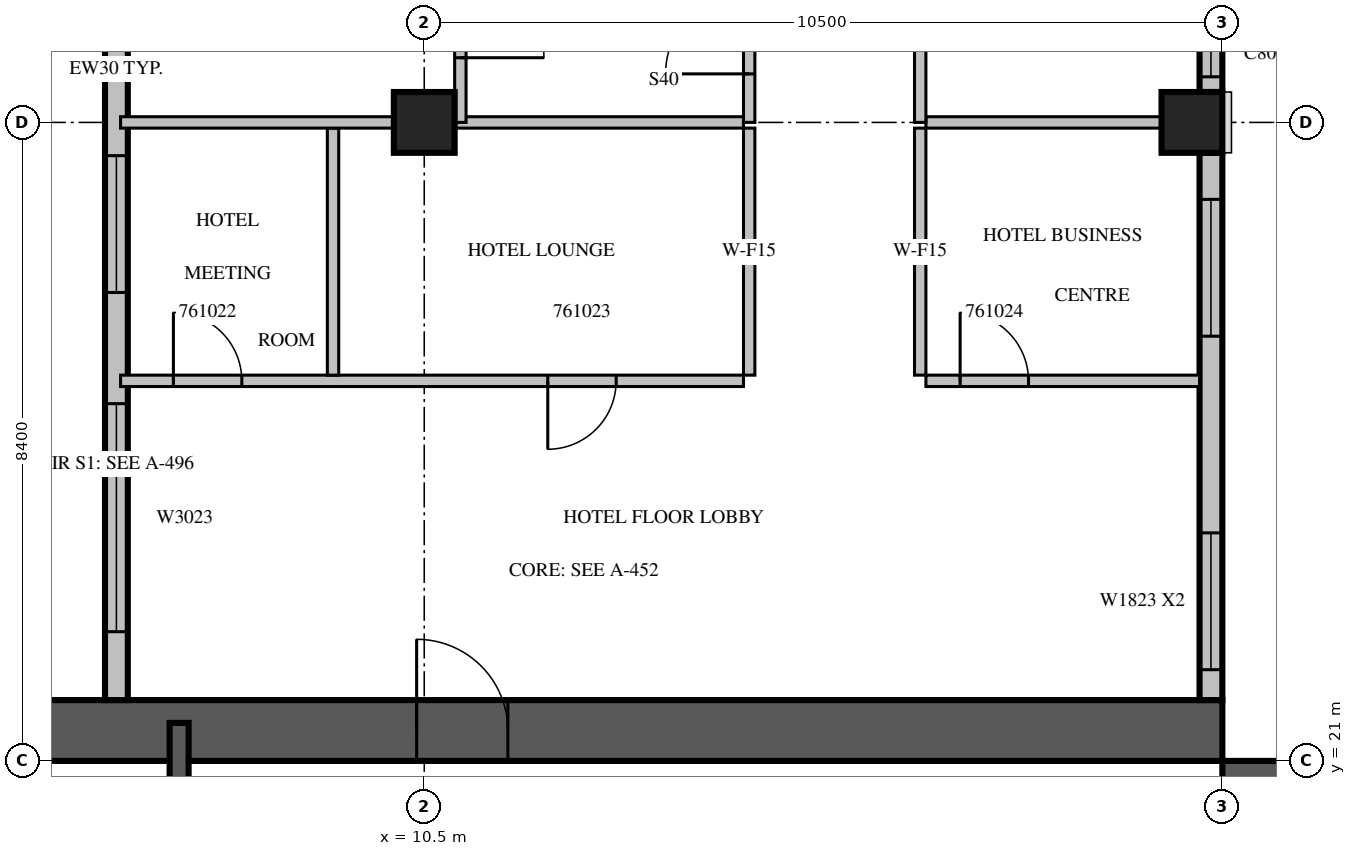
"""IFC4 building model, lengths in metres.
Left out: names, types, materials, properties, quantities, classifications, styles, units other than length and angle.
Written with IfcOpenShell. Run it as: python <this file> out.ifc"""

import sys

from ifc_helpers import new_model, si_unit, direction, frame, frame_2d, origin, origin_2d, place, context, subcontext, project, spatial, rectangle, extrude, source, transform, mapped, element, fill, save


model = new_model("IFC4")
c1 = context("Model", 3, precision=1e-05, world=origin(), true_north=direction((0.0, 1.0)))
c2 = subcontext(c1, "Body", "Model", "MODEL_VIEW")
j1 = project(units=[si_unit("LENGTHUNIT", "METRE"), si_unit("PLANEANGLEUNIT", "RADIAN")], contexts=[c1])
p1 = place(None, origin())
s1 = spatial("IfcSite", under=j1, at=p1, CompositionType="ELEMENT")
p2 = place(p1, origin())
s2 = spatial("IfcBuilding", under=s1, at=p2, CompositionType="ELEMENT")
p3 = place(p2, frame((0.0, 0.0, 265.2)))
s3 = spatial("IfcBuildingStorey", under=s2, at=p3, CompositionType="ELEMENT", Elevation=265.2)
m1 = source(origin(), c2, "Body", "SweptSolid", [
    extrude(rectangle(XDim=0.8, YDim=0.8, at=origin_2d()), origin(), (0.0, 0.0, 1.0), 3.8),
])
for number, where, z_axis, x_axis in (
    (1, (10.5, 29.4, 0.0), (0.0, 0.0, 1.0), (1.0, 0.0, 0.0)),
    (2, (20.6, 29.4, 0.0), (0.0, 0.0, 1.0), (1.0, 0.0, 0.0)),
):
    element("IfcColumn", number, at=place(p3, frame(where, z_axis=z_axis, x_axis=x_axis)), inside=s3, PredefinedType="COLUMN", context=c2, shape_type="MappedRepresentation", body=[
        mapped(m1, transform((0.0, 0.0, 0.0), scale=1.0)),
    ])
m2 = source(origin(), c2, "Body", "SweptSolid", [
    extrude(rectangle(XDim=16.8, YDim=0.8, at=frame_2d((8.4, 0.0))), origin(), (0.0, 0.0, 1.0), 3.8),
])
p4 = place(p3, frame((21.4, 4.2, 0.0), z_axis=(0.0, 0.0, 1.0), x_axis=(0.0, 1.0, 0.0)))
e3 = element("IfcWall", 3, at=p4, inside=s3, PredefinedType="SHEAR", context=c2, shape_type="MappedRepresentation", body=[
    mapped(m2, transform((0.0, 0.0, 0.0), scale=1.0)),
])
m3 = source(origin(), c2, "Body", "SweptSolid", [
    extrude(rectangle(XDim=2.2, YDim=2.1, at=frame_2d((1.1, 1.05))), frame((0.0, 0.41, 0.0), z_axis=(0.0, -1.0, 0.0), x_axis=(1.0, 0.0, 0.0)), (0.0, 0.0, 1.0), 0.82),
])
p5 = place(p4, frame((4.2, 0.0, 0.0)))
e4 = element("IfcOpeningElement", 4, at=p5, cuts=e3, PredefinedType="OPENING", context=c2, shape_type="MappedRepresentation", body=[
    mapped(m3, transform((0.0, 0.0, 0.0), scale=1.0)),
])
m4 = source(origin(), c2, "Body", "SweptSolid", [
    extrude(rectangle(XDim=1.2, YDim=2.1, at=frame_2d((0.6, 1.05))), frame((0.0, 0.41, 0.0), z_axis=(0.0, -1.0, 0.0), x_axis=(1.0, 0.0, 0.0)), (0.0, 0.0, 1.0), 0.82),
])
p6 = place(p4, frame((14.7, 0.0, 0.0)))
e5 = element("IfcOpeningElement", 5, at=p6, cuts=e3, PredefinedType="OPENING", context=c2, shape_type="MappedRepresentation", body=[
    mapped(m4, transform((0.0, 0.0, 0.0), scale=1.0)),
])
p7 = place(p3, frame((4.2, 21.4, 0.0), z_axis=(0.0, 0.0, 1.0), x_axis=(1.0, 0.0, 0.0)))
e6 = element("IfcWall", 6, at=p7, inside=s3, PredefinedType="SHEAR", context=c2, shape_type="MappedRepresentation", body=[
    mapped(m2, transform((0.0, 0.0, 0.0), scale=1.0)),
])
p8 = place(p7, frame((6.2, 0.0, 0.0)))
e7 = element("IfcOpeningElement", 7, at=p8, cuts=e6, PredefinedType="OPENING", context=c2, shape_type="MappedRepresentation", body=[
    mapped(m4, transform((0.0, 0.0, 0.0), scale=1.0)),
])
m5 = source(origin(), c2, "Body", "SweptSolid", [
    extrude(rectangle(XDim=7.2, YDim=0.3, at=frame_2d((3.6, 0.0))), origin(), (0.0, 0.0, 1.0), 3.4),
])
p9 = place(p3, frame((20.85, 21.8, 0.0), z_axis=(0.0, 0.0, 1.0), x_axis=(0.0, 1.0, 0.0)))
e8 = element("IfcWall", 8, at=p9, inside=s3, PredefinedType="STANDARD", context=c2, shape_type="MappedRepresentation", body=[
    mapped(m5, transform((0.0, 0.0, 0.0), scale=1.0)),
])
m6 = source(origin(), c2, "Body", "SweptSolid", [
    extrude(rectangle(XDim=1.8, YDim=2.3, at=frame_2d((0.9, 1.15))), frame((0.0, 0.16, 0.0), z_axis=(0.0, -1.0, 0.0), x_axis=(1.0, 0.0, 0.0)), (0.0, 0.0, 1.0), 0.32),
])
p10 = place(p9, frame((0.4, 0.0, 0.6)))
e9 = element("IfcOpeningElement", 9, at=p10, cuts=e8, PredefinedType="OPENING", context=c2, shape_type="MappedRepresentation", body=[
    mapped(m6, transform((0.0, 0.0, 0.0), scale=1.0)),
])
p11 = place(p9, frame((4.787, 0.0, 0.6)))
e10 = element("IfcOpeningElement", 10, at=p11, cuts=e8, PredefinedType="OPENING", context=c2, shape_type="MappedRepresentation", body=[
    mapped(m6, transform((0.0, 0.0, 0.0), scale=1.0)),
])
m7 = source(origin(), c2, "Body", "SweptSolid", [
    extrude(rectangle(XDim=7.6, YDim=0.3, at=frame_2d((3.8, 0.0))), origin(), (0.0, 0.0, 1.0), 3.4),
])
p12 = place(p3, frame((20.85, 29.8, 0.0), z_axis=(0.0, 0.0, 1.0), x_axis=(0.0, 1.0, 0.0)))
e11 = element("IfcWall", 11, at=p12, inside=s3, PredefinedType="STANDARD", context=c2, shape_type="MappedRepresentation", body=[
    mapped(m7, transform((0.0, 0.0, 0.0), scale=1.0)),
])
m8 = source(origin(), c2, "Body", "SweptSolid", [
    extrude(rectangle(XDim=3.0, YDim=2.3, at=frame_2d((1.5, 1.15))), frame((0.0, 0.16, 0.0), z_axis=(0.0, -1.0, 0.0), x_axis=(1.0, 0.0, 0.0)), (0.0, 0.0, 1.0), 0.32),
])
p13 = place(p12, frame((0.2, 0.0, 0.6)))
e12 = element("IfcOpeningElement", 12, at=p13, cuts=e11, PredefinedType="OPENING", context=c2, shape_type="MappedRepresentation", body=[
    mapped(m8, transform((0.0, 0.0, 0.0), scale=1.0)),
])
p14 = place(p12, frame((4.4, 0.0, 0.6)))
e13 = element("IfcOpeningElement", 13, at=p14, cuts=e11, PredefinedType="OPENING", context=c2, shape_type="MappedRepresentation", body=[
    mapped(m8, transform((0.0, 0.0, 0.0), scale=1.0)),
])
m9 = source(origin(), c2, "Body", "SweptSolid", [
    extrude(rectangle(XDim=16.6, YDim=0.3, at=frame_2d((8.3, 0.0))), origin(), (0.0, 0.0, 1.0), 3.4),
])
p15 = place(p3, frame((6.45, 38.4, 0.0), z_axis=(0.0, 0.0, 1.0), x_axis=(0.0, -1.0, 0.0)))
e14 = element("IfcWall", 14, at=p15, inside=s3, PredefinedType="STANDARD", context=c2, shape_type="MappedRepresentation", body=[
    mapped(m9, transform((0.0, 0.0, 0.0), scale=1.0)),
])
p16 = place(p15, frame((1.15, 0.0, 0.6)))
e15 = element("IfcOpeningElement", 15, at=p16, cuts=e14, PredefinedType="OPENING", context=c2, shape_type="MappedRepresentation", body=[
    mapped(m6, transform((0.0, 0.0, 0.0), scale=1.0)),
])
m10 = source(origin(), c2, "Body", "SweptSolid", [
    extrude(rectangle(XDim=2.4, YDim=2.3, at=frame_2d((1.2, 1.15))), frame((0.0, 0.16, 0.0), z_axis=(0.0, -1.0, 0.0), x_axis=(1.0, 0.0, 0.0)), (0.0, 0.0, 1.0), 0.32),
])
p17 = place(p15, frame((4.75, 0.0, 0.6)))
e16 = element("IfcOpeningElement", 16, at=p17, cuts=e14, PredefinedType="OPENING", context=c2, shape_type="MappedRepresentation", body=[
    mapped(m10, transform((0.0, 0.0, 0.0), scale=1.0)),
])
p18 = place(p15, frame((9.438, 0.0, 0.6)))
e17 = element("IfcOpeningElement", 17, at=p18, cuts=e14, PredefinedType="OPENING", context=c2, shape_type="MappedRepresentation", body=[
    mapped(m6, transform((0.0, 0.0, 0.0), scale=1.0)),
])
p19 = place(p15, frame((12.7, 0.0, 0.6)))
e18 = element("IfcOpeningElement", 18, at=p19, cuts=e14, PredefinedType="OPENING", context=c2, shape_type="MappedRepresentation", body=[
    mapped(m8, transform((0.0, 0.0, 0.0), scale=1.0)),
])
m11 = source(origin(), c2, "Body", "SweptSolid", [
    extrude(rectangle(XDim=6.6, YDim=0.25, at=frame_2d((3.3, 0.0))), origin(), (0.0, 0.0, 1.0), 3.4),
])
p20 = place(p3, frame((7.275, 14.9, 0.0), z_axis=(0.0, 0.0, 1.0), x_axis=(0.0, 1.0, 0.0)))
e19 = element("IfcWall", 19, at=p20, inside=s3, PredefinedType="SOLIDWALL", context=c2, shape_type="MappedRepresentation", body=[
    mapped(m11, transform((0.0, 0.0, 0.0), scale=1.0)),
])
m12 = source(origin(), c2, "Body", "SweptSolid", [
    extrude(rectangle(XDim=1.1, YDim=2.1, at=frame_2d((0.55, 1.05))), frame((0.0, 0.135, 0.0), z_axis=(0.0, -1.0, 0.0), x_axis=(1.0, 0.0, 0.0)), (0.0, 0.0, 1.0), 0.27),
])
p21 = place(p20, frame((0.15, 0.0, 0.0)))
e20 = element("IfcOpeningElement", 20, at=p21, cuts=e19, PredefinedType="OPENING", context=c2, shape_type="MappedRepresentation", body=[
    mapped(m12, transform((0.0, 0.0, 0.0), scale=1.0)),
])
m13 = source(origin(), c2, "Body", "SweptSolid", [
    extrude(rectangle(XDim=8.195, YDim=0.15, at=frame_2d((4.098, 0.0))), origin(), (0.0, 0.0, 1.0), 3.4),
])
p22 = place(p3, frame((6.505, 26.0, 0.0), z_axis=(0.0, 0.0, 1.0), x_axis=(1.0, 0.0, 0.0)))
e21 = element("IfcWall", 21, at=p22, inside=s3, PredefinedType="PARTITIONING", context=c2, shape_type="MappedRepresentation", body=[
    mapped(m13, transform((0.0, 0.0, 0.0), scale=1.0)),
])
m14 = source(origin(), c2, "Body", "SweptSolid", [
    extrude(rectangle(XDim=0.9, YDim=2.1, at=frame_2d((0.45, 1.05))), frame((0.0, 0.085, 0.0), z_axis=(0.0, -1.0, 0.0), x_axis=(1.0, 0.0, 0.0)), (0.0, 0.0, 1.0), 0.17),
])
p23 = place(p22, frame((0.695, 0.0, 0.0)))
e22 = element("IfcOpeningElement", 22, at=p23, cuts=e21, PredefinedType="OPENING", context=c2, shape_type="MappedRepresentation", body=[
    mapped(m14, transform((0.0, 0.0, 0.0), scale=1.0)),
])
p24 = place(p22, frame((5.62, 0.0, 0.0)))
e23 = element("IfcOpeningElement", 23, at=p24, cuts=e21, PredefinedType="OPENING", context=c2, shape_type="MappedRepresentation", body=[
    mapped(m14, transform((0.0, 0.0, 0.0), scale=1.0)),
])
m15 = source(origin(), c2, "Body", "SweptSolid", [
    extrude(rectangle(XDim=3.6, YDim=0.15, at=frame_2d((1.8, 0.0))), origin(), (0.0, 0.0, 1.0), 3.4),
])
p25 = place(p3, frame((17.1, 26.0, 0.0), z_axis=(0.0, 0.0, 1.0), x_axis=(1.0, 0.0, 0.0)))
e24 = element("IfcWall", 24, at=p25, inside=s3, PredefinedType="PARTITIONING", context=c2, shape_type="MappedRepresentation", body=[
    mapped(m15, transform((0.0, 0.0, 0.0), scale=1.0)),
])
p26 = place(p25, frame((0.45, 0.0, 0.0)))
e25 = element("IfcOpeningElement", 25, at=p26, cuts=e24, PredefinedType="OPENING", context=c2, shape_type="MappedRepresentation", body=[
    mapped(m14, transform((0.0, 0.0, 0.0), scale=1.0)),
])
m16 = source(origin(), c2, "Body", "SweptSolid", [
    extrude(rectangle(XDim=3.25, YDim=0.15, at=frame_2d((1.625, 0.0))), origin(), (0.0, 0.0, 1.0), 3.4),
])
for number, where, z_axis, x_axis in (
    (26, (9.3, 26.075, 0.0), (0.0, 0.0, 1.0), (0.0, 1.0, 0.0)),
    (27, (14.775, 26.075, 0.0), (0.0, 0.0, 1.0), (0.0, 1.0, 0.0)),
    (28, (17.025, 29.325, 0.0), (0.0, 0.0, 1.0), (0.0, -1.0, 0.0)),
):
    element("IfcWall", number, at=place(p3, frame(where, z_axis=z_axis, x_axis=x_axis)), inside=s3, PredefinedType="PARTITIONING", context=c2, shape_type="MappedRepresentation", body=[
        mapped(m16, transform((0.0, 0.0, 0.0), scale=1.0)),
    ])
m17 = source(origin(), c2, "Body", "SweptSolid", [
    extrude(rectangle(XDim=3.596, YDim=0.15, at=frame_2d((1.798, 0.0))), origin(), (0.0, 0.0, 1.0), 3.4),
])
p27 = place(p3, frame((10.101, 29.4, 0.0), z_axis=(0.0, 0.0, 1.0), x_axis=(-1.0, 0.0, 0.0)))
e29 = element("IfcWall", 29, at=p27, inside=s3, PredefinedType="PARTITIONING", context=c2, shape_type="MappedRepresentation", body=[
    mapped(m17, transform((0.0, 0.0, 0.0), scale=1.0)),
])
m18 = source(origin(), c2, "Body", "SweptSolid", [
    extrude(rectangle(XDim=3.801, YDim=0.15, at=frame_2d((1.901, 0.0))), origin(), (0.0, 0.0, 1.0), 3.4),
])
p28 = place(p3, frame((14.7, 29.4, 0.0), z_axis=(0.0, 0.0, 1.0), x_axis=(-1.0, 0.0, 0.0)))
e30 = element("IfcWall", 30, at=p28, inside=s3, PredefinedType="PARTITIONING", context=c2, shape_type="MappedRepresentation", body=[
    mapped(m18, transform((0.0, 0.0, 0.0), scale=1.0)),
])
m19 = source(origin(), c2, "Body", "SweptSolid", [
    extrude(rectangle(XDim=3.101, YDim=0.15, at=frame_2d((1.55, 0.0))), origin(), (0.0, 0.0, 1.0), 3.4),
])
p29 = place(p3, frame((20.201, 29.4, 0.0), z_axis=(0.0, 0.0, 1.0), x_axis=(-1.0, 0.0, 0.0)))
e31 = element("IfcWall", 31, at=p29, inside=s3, PredefinedType="PARTITIONING", context=c2, shape_type="MappedRepresentation", body=[
    mapped(m19, transform((0.0, 0.0, 0.0), scale=1.0)),
])
m20 = source(origin(), c2, "Body", "SweptSolid", [
    extrude(rectangle(XDim=8.4, YDim=0.15, at=frame_2d((4.2, 0.0))), origin(), (0.0, 0.0, 1.0), 3.4),
])
p30 = place(p3, frame((10.975, 29.4, 0.0), z_axis=(0.0, 0.0, 1.0), x_axis=(0.0, 1.0, 0.0)))
e32 = element("IfcWall", 32, at=p30, inside=s3, PredefinedType="PARTITIONING", context=c2, shape_type="MappedRepresentation", body=[
    mapped(m20, transform((0.0, 0.0, 0.0), scale=1.0)),
])
m21 = source(origin(), c2, "Body", "SweptSolid", [
    extrude(rectangle(XDim=1.1, YDim=2.1, at=frame_2d((0.55, 1.05))), frame((0.0, 0.085, 0.0), z_axis=(0.0, -1.0, 0.0), x_axis=(1.0, 0.0, 0.0)), (0.0, 0.0, 1.0), 0.17),
])
p31 = place(p30, frame((0.851, 0.0, 0.0)))
e33 = element("IfcOpeningElement", 33, at=p31, cuts=e32, PredefinedType="OPENING", context=c2, shape_type="MappedRepresentation", body=[
    mapped(m21, transform((0.0, 0.0, 0.0), scale=1.0)),
])
p32 = place(p30, frame((3.38, 0.0, 0.0)))
e34 = element("IfcOpeningElement", 34, at=p32, cuts=e32, PredefinedType="OPENING", context=c2, shape_type="MappedRepresentation", body=[
    mapped(m14, transform((0.0, 0.0, 0.0), scale=1.0)),
])
p33 = place(p30, frame((6.179, 0.0, 0.0)))
e35 = element("IfcOpeningElement", 35, at=p33, cuts=e32, PredefinedType="OPENING", context=c2, shape_type="MappedRepresentation", body=[
    mapped(m14, transform((0.0, 0.0, 0.0), scale=1.0)),
])
p34 = place(p3, frame((14.775, 29.4, 0.0), z_axis=(0.0, 0.0, 1.0), x_axis=(0.0, 1.0, 0.0)))
e36 = element("IfcWall", 36, at=p34, inside=s3, PredefinedType="PARTITIONING", context=c2, shape_type="MappedRepresentation", body=[
    mapped(m20, transform((0.0, 0.0, 0.0), scale=1.0)),
])
p35 = place(p34, frame((0.638, 0.0, 0.0)))
e37 = element("IfcOpeningElement", 37, at=p35, cuts=e36, PredefinedType="OPENING", context=c2, shape_type="MappedRepresentation", body=[
    mapped(m21, transform((0.0, 0.0, 0.0), scale=1.0)),
])
m22 = source(origin(), c2, "Body", "SweptSolid", [
    extrude(rectangle(XDim=19.86, YDim=0.15, at=frame_2d((9.93, 0.0))), origin(), (0.0, 0.0, 1.0), 3.4),
])
p36 = place(p3, frame((17.025, 49.26, 0.0), z_axis=(0.0, 0.0, 1.0), x_axis=(0.0, -1.0, 0.0)))
e38 = element("IfcWall", 38, at=p36, inside=s3, PredefinedType="PARTITIONING", context=c2, shape_type="MappedRepresentation", body=[
    mapped(m22, transform((0.0, 0.0, 0.0), scale=1.0)),
])
m23 = source(origin(), c2, "Body", "SweptSolid", [
    extrude(rectangle(XDim=1.2, YDim=2.1, at=frame_2d((0.6, 1.05))), frame((0.0, 0.085, 0.0), z_axis=(0.0, -1.0, 0.0), x_axis=(1.0, 0.0, 0.0)), (0.0, 0.0, 1.0), 0.17),
])
p37 = place(p36, frame((15.06, 0.0, 0.0)))
e39 = element("IfcOpeningElement", 39, at=p37, cuts=e38, PredefinedType="OPENING", context=c2, shape_type="MappedRepresentation", body=[
    mapped(m23, transform((0.0, 0.0, 0.0), scale=1.0)),
])
m24 = source(origin(), c2, "Body", "SweptSolid", [
    extrude(rectangle(XDim=1.0, YDim=2.1, at=frame_2d((0.5, 1.05))), frame((0.0, 0.085, 0.0), z_axis=(0.0, -1.0, 0.0), x_axis=(1.0, 0.0, 0.0)), (0.0, 0.0, 1.0), 0.17),
])
p38 = place(p36, frame((6.63, 0.0, 0.0)))
e40 = element("IfcOpeningElement", 40, at=p38, cuts=e38, PredefinedType="OPENING", context=c2, shape_type="MappedRepresentation", body=[
    mapped(m24, transform((0.0, 0.0, 0.0), scale=1.0)),
])
m25 = source(origin(), c2, "Body", "SweptSolid", [
    extrude(rectangle(XDim=1.8, YDim=2.3, at=frame_2d((0.9, 1.15))), frame((0.0, 0.03, 0.0), z_axis=(0.0, -1.0, 0.0), x_axis=(1.0, 0.0, 0.0)), (0.0, 0.0, 1.0), 0.06),
])
p39 = place(p10, origin())
e41 = element("IfcWindow", 41, at=p39, inside=s3, PartitioningType="SINGLE_PANEL", PredefinedType="WINDOW", context=c2, shape_type="MappedRepresentation", body=[
    mapped(m25, transform((0.0, 0.0, 0.0), scale=1.0)),
])
fill(e9, e41)
p40 = place(p11, origin())
e42 = element("IfcWindow", 42, at=p40, inside=s3, PartitioningType="SINGLE_PANEL", PredefinedType="WINDOW", context=c2, shape_type="MappedRepresentation", body=[
    mapped(m25, transform((0.0, 0.0, 0.0), scale=1.0)),
])
fill(e10, e42)
m26 = source(origin(), c2, "Body", "SweptSolid", [
    extrude(rectangle(XDim=3.0, YDim=2.3, at=frame_2d((1.5, 1.15))), frame((0.0, 0.03, 0.0), z_axis=(0.0, -1.0, 0.0), x_axis=(1.0, 0.0, 0.0)), (0.0, 0.0, 1.0), 0.06),
])
p41 = place(p13, origin())
e43 = element("IfcWindow", 43, at=p41, inside=s3, PartitioningType="SINGLE_PANEL", PredefinedType="WINDOW", context=c2, shape_type="MappedRepresentation", body=[
    mapped(m26, transform((0.0, 0.0, 0.0), scale=1.0)),
])
fill(e12, e43)
p42 = place(p18, origin())
e44 = element("IfcWindow", 44, at=p42, inside=s3, PartitioningType="SINGLE_PANEL", PredefinedType="WINDOW", context=c2, shape_type="MappedRepresentation", body=[
    mapped(m25, transform((0.0, 0.0, 0.0), scale=1.0)),
])
fill(e17, e44)
p43 = place(p19, origin())
e45 = element("IfcWindow", 45, at=p43, inside=s3, PartitioningType="SINGLE_PANEL", PredefinedType="WINDOW", context=c2, shape_type="MappedRepresentation", body=[
    mapped(m26, transform((0.0, 0.0, 0.0), scale=1.0)),
])
fill(e18, e45)
m27 = source(origin(), c2, "Body", "SweptSolid", [
    extrude(rectangle(XDim=1.2, YDim=2.1, at=frame_2d((0.6, 1.05))), frame((0.0, 0.025, 0.0), z_axis=(0.0, -1.0, 0.0), x_axis=(1.0, 0.0, 0.0)), (0.0, 0.0, 1.0), 0.05),
])
p44 = place(p8, origin())
e46 = element("IfcDoor", 46, at=p44, inside=s3, OperationType="SINGLE_SWING_LEFT", PredefinedType="DOOR", context=c2, shape_type="MappedRepresentation", body=[
    mapped(m27, transform((0.0, 0.0, 0.0), scale=1.0)),
])
fill(e7, e46)
m28 = source(origin(), c2, "Body", "SweptSolid", [
    extrude(rectangle(XDim=0.9, YDim=2.1, at=frame_2d((0.45, 1.05))), frame((0.0, 0.025, 0.0), z_axis=(0.0, -1.0, 0.0), x_axis=(1.0, 0.0, 0.0)), (0.0, 0.0, 1.0), 0.05),
])
p45 = place(p23, origin())
e47 = element("IfcDoor", 47, at=p45, inside=s3, OperationType="SINGLE_SWING_LEFT", PredefinedType="DOOR", context=c2, shape_type="MappedRepresentation", body=[
    mapped(m28, transform((0.0, 0.0, 0.0), scale=1.0)),
])
fill(e22, e47)
p46 = place(p24, origin())
e48 = element("IfcDoor", 48, at=p46, inside=s3, OperationType="SINGLE_SWING_RIGHT", PredefinedType="DOOR", context=c2, shape_type="MappedRepresentation", body=[
    mapped(m28, transform((0.0, 0.0, 0.0), scale=1.0)),
])
fill(e23, e48)
p47 = place(p26, origin())
e49 = element("IfcDoor", 49, at=p47, inside=s3, OperationType="SINGLE_SWING_LEFT", PredefinedType="DOOR", context=c2, shape_type="MappedRepresentation", body=[
    mapped(m28, transform((0.0, 0.0, 0.0), scale=1.0)),
])
fill(e25, e49)
m29 = source(origin(), c2, "Body", "SweptSolid", [
    extrude(rectangle(XDim=1.1, YDim=2.1, at=frame_2d((0.55, 1.05))), frame((0.0, 0.025, 0.0), z_axis=(0.0, -1.0, 0.0), x_axis=(1.0, 0.0, 0.0)), (0.0, 0.0, 1.0), 0.05),
])
p48 = place(p35, origin())
e50 = element("IfcDoor", 50, at=p48, inside=s3, OperationType="SINGLE_SWING_LEFT", PredefinedType="DOOR", context=c2, shape_type="MappedRepresentation", body=[
    mapped(m29, transform((0.0, 0.0, 0.0), scale=1.0)),
])
fill(e37, e50)
p49 = place(p31, origin())
e51 = element("IfcDoor", 51, at=p49, inside=s3, OperationType="SINGLE_SWING_RIGHT", PredefinedType="DOOR", context=c2, shape_type="MappedRepresentation", body=[
    mapped(m29, transform((0.0, 0.0, 0.0), scale=1.0)),
])
fill(e33, e51)
save(model, sys.argv[1])
